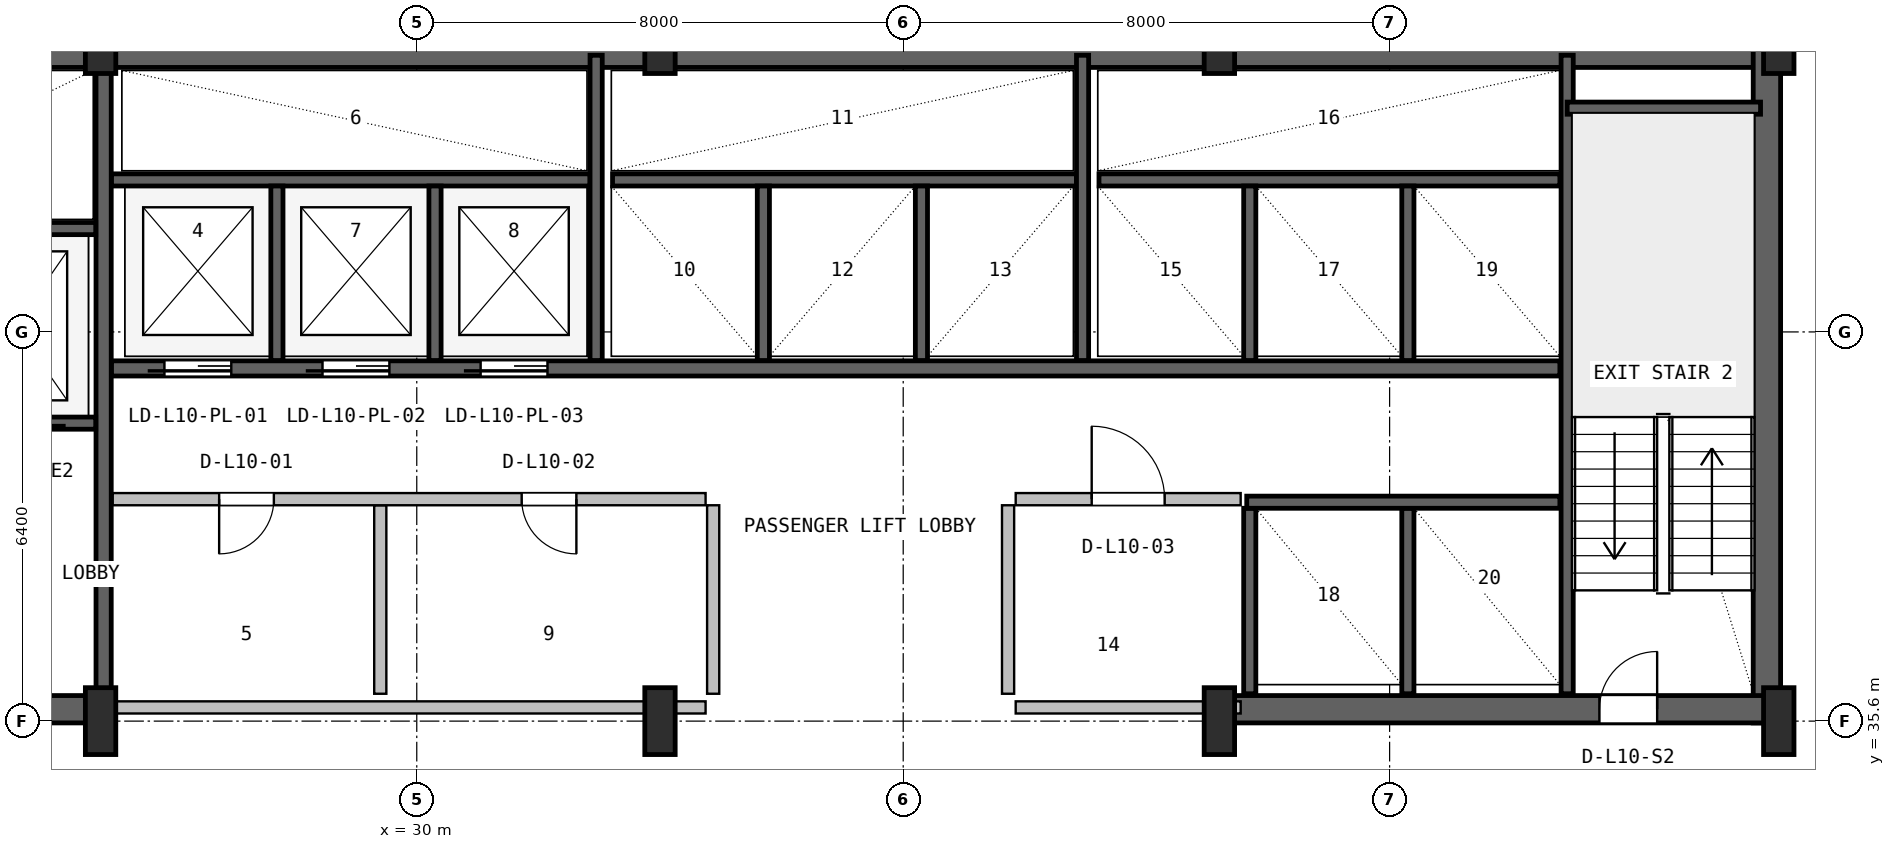
"""IFC4 building model, lengths in metres.
Left out: names, types, materials, properties, quantities, classifications, styles, units other than length and angle.
Written with IfcOpenShell. Run it as: python <this file> out.ifc"""

import sys

from ifc_helpers import new_model, si_unit, direction, frame, frame_2d, origin, origin_2d, place, context, subcontext, project, spatial, rectangle, i_section, extrude, source, transform, mapped, element, fill, save


model = new_model("IFC4")
c1 = context("Model", 3, precision=1e-05, world=origin(), true_north=direction((0.0, 1.0)))
c2 = subcontext(c1, "Body", "Model", "MODEL_VIEW")
j1 = project(units=[si_unit("LENGTHUNIT", "METRE"), si_unit("PLANEANGLEUNIT", "RADIAN")], contexts=[c1])
p1 = place(None, origin())
s1 = spatial("IfcSite", under=j1, at=p1, CompositionType="ELEMENT")
p2 = place(p1, origin())
s2 = spatial("IfcBuilding", under=s1, at=p2, CompositionType="ELEMENT")
p3 = place(p2, frame((0.0, 0.0, 47.1)))
s3 = spatial("IfcBuildingStorey", under=s2, at=p3, CompositionType="ELEMENT", Elevation=47.1)
p4 = place(p3, frame((15.6, 46.575, 0.0), z_axis=(0.0, 0.0, 1.0), x_axis=(1.0, 0.0, 0.0)))
e1 = element("IfcWall", 1, at=p4, inside=s3, PredefinedType="SHEAR", context=c2, shape_type="SweptSolid", body=[
    extrude(rectangle(XDim=36.8, YDim=0.45, at=frame_2d((18.4, 0.0))), origin(), (0.0, 0.0, 1.0), 3.65),
])
p5 = place(p3, frame((52.205, 35.57, 0.0), z_axis=(0.0, 0.0, 1.0), x_axis=(0.0, 1.0, 0.0)))
e2 = element("IfcWall", 2, at=p5, inside=s3, PredefinedType="SHEAR", context=c2, shape_type="SweptSolid", body=[
    extrude(rectangle(XDim=11.23, YDim=0.45, at=frame_2d((5.615, 0.0))), origin(), (0.0, 0.0, 1.0), 3.65),
])
p6 = place(p3, frame((15.57, 35.795, 0.0), z_axis=(0.0, 0.0, 1.0), x_axis=(1.0, 0.0, 0.0)))
e3 = element("IfcWall", 3, at=p6, inside=s3, PredefinedType="SHEAR", context=c2, shape_type="SweptSolid", body=[
    extrude(rectangle(XDim=9.23, YDim=0.45, at=frame_2d((4.615, 0.0))), origin(), (0.0, 0.0, 1.0), 3.65),
])
p7 = place(p6, frame((5.4, 0.0, 0.0)))
e4 = element("IfcOpeningElement", 4, at=p7, cuts=e3, PredefinedType="OPENING", context=c2, shape_type="SweptSolid", body=[
    extrude(rectangle(XDim=1.0, YDim=2.1, at=frame_2d((0.5, 1.05))), frame((0.0, 0.235, 0.0), z_axis=(0.0, -1.0, 0.0), x_axis=(1.0, 0.0, 0.0)), (0.0, 0.0, 1.0), 0.47),
])
p8 = place(p3, frame((43.2, 35.795, 0.0), z_axis=(0.0, 0.0, 1.0), x_axis=(1.0, 0.0, 0.0)))
e5 = element("IfcWall", 5, at=p8, inside=s3, PredefinedType="SHEAR", context=c2, shape_type="SweptSolid", body=[
    extrude(rectangle(XDim=9.23, YDim=0.45, at=frame_2d((4.615, 0.0))), origin(), (0.0, 0.0, 1.0), 3.65),
])
p9 = place(p8, frame((6.25, 0.0, 0.0)))
e6 = element("IfcOpeningElement", 6, at=p9, cuts=e5, PredefinedType="OPENING", context=c2, shape_type="SweptSolid", body=[
    extrude(rectangle(XDim=0.95, YDim=2.1, at=frame_2d((0.475, 1.05))), frame((0.0, 0.235, 0.0), z_axis=(0.0, -1.0, 0.0), x_axis=(1.0, 0.0, 0.0)), (0.0, 0.0, 1.0), 0.47),
])
m1 = source(origin(), c2, "Body", "SweptSolid", [
    extrude(i_section(OverallWidth=0.5, OverallDepth=1.1, WebThickness=0.018, FlangeThickness=0.032, FilletRadius=0.018, at=origin_2d()), origin(), (0.0, 0.0, 1.0), 3.9),
])
for number, where, z_axis, x_axis in (
    (7, (24.8, 35.6, 0.0), (0.0, 0.0, 1.0), (1.0, 0.0, 0.0)),
    (8, (24.8, 46.8, 0.0), (0.0, 0.0, 1.0), (1.0, 0.0, 0.0)),
    (9, (34.0, 35.6, 0.0), (0.0, 0.0, 1.0), (1.0, 0.0, 0.0)),
    (10, (34.0, 46.8, 0.0), (0.0, 0.0, 1.0), (1.0, 0.0, 0.0)),
    (11, (43.2, 35.6, 0.0), (0.0, 0.0, 1.0), (1.0, 0.0, 0.0)),
    (12, (43.2, 46.8, 0.0), (0.0, 0.0, 1.0), (1.0, 0.0, 0.0)),
    (13, (52.4, 35.6, 0.0), (0.0, 0.0, 1.0), (1.0, 0.0, 0.0)),
    (14, (52.4, 46.8, 0.0), (0.0, 0.0, 1.0), (1.0, 0.0, 0.0)),
):
    element("IfcColumn", number, at=place(p3, frame(where, z_axis=z_axis, x_axis=x_axis)), inside=s3, PredefinedType="COLUMN", context=c2, shape_type="MappedRepresentation", body=[
        mapped(m1, transform((0.0, 0.0, 0.0), x_axis=(1.0, 0.0, 0.0), y_axis=(0.0, 1.0, 0.0), z_axis=(0.0, 0.0, 1.0), scale=1.0)),
    ])
p10 = place(p3, frame((24.85, 36.05, 0.0), z_axis=(0.0, 0.0, 1.0), x_axis=(0.0, 1.0, 0.0)))
e15 = element("IfcWall", 15, at=p10, inside=s3, PredefinedType="SHEAR", context=c2, shape_type="SweptSolid", body=[
    extrude(rectangle(XDim=10.45, YDim=0.25, at=frame_2d((5.225, 0.0))), origin(), (0.0, 0.0, 1.0), 3.65),
])
p11 = place(p3, frame((19.2, 40.5, 0.0), z_axis=(0.0, 0.0, 1.0), x_axis=(1.0, 0.0, 0.0)))
e16 = element("IfcWall", 16, at=p11, inside=s3, PredefinedType="SHEAR", context=c2, shape_type="SweptSolid", body=[
    extrude(rectangle(XDim=5.52, YDim=0.2, at=frame_2d((2.76, 0.0))), origin(), (0.0, 0.0, 1.0), 3.65),
])
p12 = place(p11, frame((1.05, 0.0, 0.0)))
e17 = element("IfcOpeningElement", 17, at=p12, cuts=e16, PredefinedType="OPENING", context=c2, shape_type="SweptSolid", body=[
    extrude(rectangle(XDim=1.1, YDim=2.18, at=frame_2d((0.55, 1.09))), frame((0.0, 0.11, 0.0), z_axis=(0.0, -1.0, 0.0), x_axis=(1.0, 0.0, 0.0)), (0.0, 0.0, 1.0), 0.22),
])
p13 = place(p11, frame((3.65, 0.0, 0.0)))
e18 = element("IfcOpeningElement", 18, at=p13, cuts=e16, PredefinedType="OPENING", context=c2, shape_type="SweptSolid", body=[
    extrude(rectangle(XDim=1.1, YDim=2.18, at=frame_2d((0.55, 1.09))), frame((0.0, 0.11, 0.0), z_axis=(0.0, -1.0, 0.0), x_axis=(1.0, 0.0, 0.0)), (0.0, 0.0, 1.0), 0.22),
])
p14 = place(p3, frame((19.2, 43.7, 0.0), z_axis=(0.0, 0.0, 1.0), x_axis=(1.0, 0.0, 0.0)))
e19 = element("IfcWall", 19, at=p14, inside=s3, PredefinedType="SHEAR", context=c2, shape_type="SweptSolid", body=[
    extrude(rectangle(XDim=5.52, YDim=0.2, at=frame_2d((2.76, 0.0))), origin(), (0.0, 0.0, 1.0), 3.65),
])
p15 = place(p3, frame((48.92, 36.05, 0.0), z_axis=(0.0, 0.0, 1.0), x_axis=(0.0, 1.0, 0.0)))
e20 = element("IfcWall", 20, at=p15, inside=s3, PredefinedType="SHEAR", context=c2, shape_type="SweptSolid", body=[
    extrude(rectangle(XDim=10.5, YDim=0.2, at=frame_2d((5.25, 0.0))), origin(), (0.0, 0.0, 1.0), 3.65),
])
p16 = place(p3, frame((48.92, 45.68, 0.0), z_axis=(0.0, 0.0, 1.0), x_axis=(1.0, 0.0, 0.0)))
e21 = element("IfcWall", 21, at=p16, inside=s3, PredefinedType="SHEAR", context=c2, shape_type="SweptSolid", body=[
    extrude(rectangle(XDim=3.18, YDim=0.2, at=frame_2d((1.59, 0.0))), origin(), (0.0, 0.0, 1.0), 3.65),
])
p17 = place(p3, frame((24.98, 41.4, 0.0), z_axis=(0.0, 0.0, 1.0), x_axis=(1.0, 0.0, 0.0)))
e22 = element("IfcWall", 22, at=p17, inside=s3, PredefinedType="SHEAR", context=c2, shape_type="SweptSolid", body=[
    extrude(rectangle(XDim=23.82, YDim=0.25, at=frame_2d((11.91, 0.0))), origin(), (0.0, 0.0, 1.0), 3.65),
])
p18 = place(p17, frame((0.87, 0.0, 0.0)))
e23 = element("IfcOpeningElement", 23, at=p18, cuts=e22, PredefinedType="OPENING", context=c2, shape_type="SweptSolid", body=[
    extrude(rectangle(XDim=1.1, YDim=2.18, at=frame_2d((0.55, 1.09))), frame((0.0, 0.135, 0.0), z_axis=(0.0, -1.0, 0.0), x_axis=(1.0, 0.0, 0.0)), (0.0, 0.0, 1.0), 0.27),
])
p19 = place(p17, frame((3.47, 0.0, 0.0)))
e24 = element("IfcOpeningElement", 24, at=p19, cuts=e22, PredefinedType="OPENING", context=c2, shape_type="SweptSolid", body=[
    extrude(rectangle(XDim=1.1, YDim=2.18, at=frame_2d((0.55, 1.09))), frame((0.0, 0.135, 0.0), z_axis=(0.0, -1.0, 0.0), x_axis=(1.0, 0.0, 0.0)), (0.0, 0.0, 1.0), 0.27),
])
p20 = place(p17, frame((6.07, 0.0, 0.0)))
e25 = element("IfcOpeningElement", 25, at=p20, cuts=e22, PredefinedType="OPENING", context=c2, shape_type="SweptSolid", body=[
    extrude(rectangle(XDim=1.1, YDim=2.18, at=frame_2d((0.55, 1.09))), frame((0.0, 0.135, 0.0), z_axis=(0.0, -1.0, 0.0), x_axis=(1.0, 0.0, 0.0)), (0.0, 0.0, 1.0), 0.27),
])
p21 = place(p3, frame((24.98, 44.5, 0.0), z_axis=(0.0, 0.0, 1.0), x_axis=(1.0, 0.0, 0.0)))
e26 = element("IfcWall", 26, at=p21, inside=s3, PredefinedType="SHEAR", context=c2, shape_type="SweptSolid", body=[
    extrude(rectangle(XDim=7.87, YDim=0.2, at=frame_2d((3.935, 0.0))), origin(), (0.0, 0.0, 1.0), 3.65),
])
for number, where, z_axis, x_axis in (
    (27, (27.7, 41.53, 0.0), (0.0, 0.0, 1.0), (0.0, 1.0, 0.0)),
    (28, (30.3, 41.53, 0.0), (0.0, 0.0, 1.0), (0.0, 1.0, 0.0)),
):
    element("IfcWall", number, at=place(p3, frame(where, z_axis=z_axis, x_axis=x_axis)), inside=s3, PredefinedType="SHEAR", context=c2, shape_type="SweptSolid", body=[
        extrude(rectangle(XDim=2.87, YDim=0.2, at=frame_2d((1.435, 0.0))), origin(), (0.0, 0.0, 1.0), 3.65),
    ])
p22 = place(p3, frame((32.95, 41.53, 0.0), z_axis=(0.0, 0.0, 1.0), x_axis=(0.0, 1.0, 0.0)))
e29 = element("IfcWall", 29, at=p22, inside=s3, PredefinedType="SHEAR", context=c2, shape_type="SweptSolid", body=[
    extrude(rectangle(XDim=5.02, YDim=0.2, at=frame_2d((2.51, 0.0))), origin(), (0.0, 0.0, 1.0), 3.65),
])
p23 = place(p3, frame((33.22, 44.5, 0.0), z_axis=(0.0, 0.0, 1.0), x_axis=(1.0, 0.0, 0.0)))
e30 = element("IfcWall", 30, at=p23, inside=s3, PredefinedType="SHEAR", context=c2, shape_type="SweptSolid", body=[
    extrude(rectangle(XDim=7.63, YDim=0.2, at=frame_2d((3.815, 0.0))), origin(), (0.0, 0.0, 1.0), 3.65),
])
for number, where, z_axis, x_axis in (
    (31, (35.7, 41.53, 0.0), (0.0, 0.0, 1.0), (0.0, 1.0, 0.0)),
    (32, (38.3, 41.53, 0.0), (0.0, 0.0, 1.0), (0.0, 1.0, 0.0)),
):
    element("IfcWall", number, at=place(p3, frame(where, z_axis=z_axis, x_axis=x_axis)), inside=s3, PredefinedType="SHEAR", context=c2, shape_type="SweptSolid", body=[
        extrude(rectangle(XDim=2.87, YDim=0.2, at=frame_2d((1.435, 0.0))), origin(), (0.0, 0.0, 1.0), 3.65),
    ])
p24 = place(p3, frame((40.95, 41.53, 0.0), z_axis=(0.0, 0.0, 1.0), x_axis=(0.0, 1.0, 0.0)))
e33 = element("IfcWall", 33, at=p24, inside=s3, PredefinedType="SHEAR", context=c2, shape_type="SweptSolid", body=[
    extrude(rectangle(XDim=5.02, YDim=0.2, at=frame_2d((2.51, 0.0))), origin(), (0.0, 0.0, 1.0), 3.65),
])
p25 = place(p3, frame((41.22, 44.5, 0.0), z_axis=(0.0, 0.0, 1.0), x_axis=(1.0, 0.0, 0.0)))
e34 = element("IfcWall", 34, at=p25, inside=s3, PredefinedType="SHEAR", context=c2, shape_type="SweptSolid", body=[
    extrude(rectangle(XDim=7.58, YDim=0.2, at=frame_2d((3.79, 0.0))), origin(), (0.0, 0.0, 1.0), 3.65),
])
for number, where, z_axis, x_axis in (
    (35, (43.7, 41.53, 0.0), (0.0, 0.0, 1.0), (0.0, 1.0, 0.0)),
    (36, (46.3, 41.53, 0.0), (0.0, 0.0, 1.0), (0.0, 1.0, 0.0)),
):
    element("IfcWall", number, at=place(p3, frame(where, z_axis=z_axis, x_axis=x_axis)), inside=s3, PredefinedType="SHEAR", context=c2, shape_type="SweptSolid", body=[
        extrude(rectangle(XDim=2.87, YDim=0.2, at=frame_2d((1.435, 0.0))), origin(), (0.0, 0.0, 1.0), 3.65),
    ])
for number, where, z_axis, x_axis in (
    (37, (43.7, 36.05, 0.0), (0.0, 0.0, 1.0), (0.0, 1.0, 0.0)),
    (38, (46.3, 36.05, 0.0), (0.0, 0.0, 1.0), (0.0, 1.0, 0.0)),
):
    element("IfcWall", number, at=place(p3, frame(where, z_axis=z_axis, x_axis=x_axis)), inside=s3, PredefinedType="SHEAR", context=c2, shape_type="SweptSolid", body=[
        extrude(rectangle(XDim=3.05, YDim=0.2, at=frame_2d((1.525, 0.0))), origin(), (0.0, 0.0, 1.0), 3.65),
    ])
p26 = place(p3, frame((43.65, 39.2, 0.0), z_axis=(0.0, 0.0, 1.0), x_axis=(1.0, 0.0, 0.0)))
e39 = element("IfcWall", 39, at=p26, inside=s3, PredefinedType="SHEAR", context=c2, shape_type="SweptSolid", body=[
    extrude(rectangle(XDim=5.15, YDim=0.2, at=frame_2d((2.575, 0.0))), origin(), (0.0, 0.0, 1.0), 3.65),
])
p27 = place(p3, frame((25.0, 35.825, 0.0), z_axis=(0.0, 0.0, 1.0), x_axis=(1.0, 0.0, 0.0)))
e40 = element("IfcWall", 40, at=p27, inside=s3, PredefinedType="PLUMBINGWALL", context=c2, shape_type="SweptSolid", body=[
    extrude(rectangle(XDim=9.75, YDim=0.2, at=frame_2d((4.875, 0.0))), origin(), (0.0, 0.0, 1.0), 2.425),
])
p28 = place(p3, frame((29.4, 36.05, 0.0), z_axis=(0.0, 0.0, 1.0), x_axis=(0.0, 1.0, 0.0)))
e41 = element("IfcWall", 41, at=p28, inside=s3, PredefinedType="PLUMBINGWALL", context=c2, shape_type="SweptSolid", body=[
    extrude(rectangle(XDim=3.1, YDim=0.2, at=frame_2d((1.55, 0.0))), origin(), (0.0, 0.0, 1.0), 3.63),
])
p29 = place(p3, frame((25.0, 39.25, 0.0), z_axis=(0.0, 0.0, 1.0), x_axis=(1.0, 0.0, 0.0)))
e42 = element("IfcWall", 42, at=p29, inside=s3, PredefinedType="PLUMBINGWALL", context=c2, shape_type="SweptSolid", body=[
    extrude(rectangle(XDim=9.75, YDim=0.2, at=frame_2d((4.875, 0.0))), origin(), (0.0, 0.0, 1.0), 3.63),
])
p30 = place(p29, frame((1.75, 0.0, 0.0)))
e43 = element("IfcOpeningElement", 43, at=p30, cuts=e42, PredefinedType="OPENING", context=c2, shape_type="SweptSolid", body=[
    extrude(rectangle(XDim=0.9, YDim=2.06, at=frame_2d((0.45, 1.03))), frame((0.0, 0.11, 0.0), z_axis=(0.0, -1.0, 0.0), x_axis=(1.0, 0.0, 0.0)), (0.0, 0.0, 1.0), 0.22),
])
p31 = place(p29, frame((6.725, 0.0, 0.0)))
e44 = element("IfcOpeningElement", 44, at=p31, cuts=e42, PredefinedType="OPENING", context=c2, shape_type="SweptSolid", body=[
    extrude(rectangle(XDim=0.9, YDim=2.06, at=frame_2d((0.45, 1.03))), frame((0.0, 0.11, 0.0), z_axis=(0.0, -1.0, 0.0), x_axis=(1.0, 0.0, 0.0)), (0.0, 0.0, 1.0), 0.22),
])
p32 = place(p3, frame((34.875, 36.05, 0.0), z_axis=(0.0, 0.0, 1.0), x_axis=(0.0, 1.0, 0.0)))
e45 = element("IfcWall", 45, at=p32, inside=s3, PredefinedType="PLUMBINGWALL", context=c2, shape_type="SweptSolid", body=[
    extrude(rectangle(XDim=3.1, YDim=0.2, at=frame_2d((1.55, 0.0))), origin(), (0.0, 0.0, 1.0), 3.63),
])
p33 = place(p3, frame((39.85, 35.825, 0.0), z_axis=(0.0, 0.0, 1.0), x_axis=(1.0, 0.0, 0.0)))
e46 = element("IfcWall", 46, at=p33, inside=s3, PredefinedType="SOLIDWALL", context=c2, shape_type="SweptSolid", body=[
    extrude(rectangle(XDim=3.7, YDim=0.2, at=frame_2d((1.85, 0.0))), origin(), (0.0, 0.0, 1.0), 2.425),
])
p34 = place(p3, frame((39.85, 39.25, 0.0), z_axis=(0.0, 0.0, 1.0), x_axis=(1.0, 0.0, 0.0)))
e47 = element("IfcWall", 47, at=p34, inside=s3, PredefinedType="SOLIDWALL", context=c2, shape_type="SweptSolid", body=[
    extrude(rectangle(XDim=3.7, YDim=0.2, at=frame_2d((1.85, 0.0))), origin(), (0.0, 0.0, 1.0), 3.63),
])
p35 = place(p34, frame((1.25, 0.0, 0.0)))
e48 = element("IfcOpeningElement", 48, at=p35, cuts=e47, PredefinedType="OPENING", context=c2, shape_type="SweptSolid", body=[
    extrude(rectangle(XDim=1.2, YDim=2.1, at=frame_2d((0.6, 1.05))), frame((0.0, 0.11, 0.0), z_axis=(0.0, -1.0, 0.0), x_axis=(1.0, 0.0, 0.0)), (0.0, 0.0, 1.0), 0.22),
])
p36 = place(p3, frame((39.725, 36.05, 0.0), z_axis=(0.0, 0.0, 1.0), x_axis=(0.0, 1.0, 0.0)))
e49 = element("IfcWall", 49, at=p36, inside=s3, PredefinedType="SOLIDWALL", context=c2, shape_type="SweptSolid", body=[
    extrude(rectangle(XDim=3.1, YDim=0.2, at=frame_2d((1.55, 0.0))), origin(), (0.0, 0.0, 1.0), 3.63),
])
m2 = source(origin(), c2, "Body", "SweptSolid", [
    extrude(rectangle(XDim=0.95, YDim=2.1, at=frame_2d((0.475, 1.05))), frame((0.0, 0.025, 0.0), z_axis=(0.0, -1.0, 0.0), x_axis=(1.0, 0.0, 0.0)), (0.0, 0.0, 1.0), 0.05),
])
p37 = place(p9, origin())
e50 = element("IfcDoor", 50, at=p37, inside=s3, OperationType="SINGLE_SWING_RIGHT", PredefinedType="DOOR", context=c2, shape_type="MappedRepresentation", body=[
    mapped(m2, transform((0.0, 0.0, 0.0), x_axis=(1.0, 0.0, 0.0), y_axis=(0.0, 1.0, 0.0), z_axis=(0.0, 0.0, 1.0), scale=1.0)),
])
fill(e6, e50)
m3 = source(origin(), c2, "Body", "SweptSolid", [
    extrude(rectangle(XDim=1.1, YDim=2.18, at=frame_2d((0.55, 1.09))), frame((0.0, 0.025, 0.0), z_axis=(0.0, -1.0, 0.0), x_axis=(1.0, 0.0, 0.0)), (0.0, 0.0, 1.0), 0.05),
])
p38 = place(p18, frame((1.1, 0.0, 0.0), z_axis=(0.0, 0.0, 1.0), x_axis=(-1.0, 0.0, 0.0)))
e51 = element("IfcDoor", 51, at=p38, inside=s3, OperationType="SLIDING_TO_LEFT", PredefinedType="DOOR", context=c2, shape_type="MappedRepresentation", body=[
    mapped(m3, transform((0.0, 0.0, 0.0), x_axis=(1.0, 0.0, 0.0), y_axis=(0.0, 1.0, 0.0), z_axis=(0.0, 0.0, 1.0), scale=1.0)),
])
fill(e23, e51)
p39 = place(p19, frame((1.1, 0.0, 0.0), z_axis=(0.0, 0.0, 1.0), x_axis=(-1.0, 0.0, 0.0)))
e52 = element("IfcDoor", 52, at=p39, inside=s3, OperationType="SLIDING_TO_LEFT", PredefinedType="DOOR", context=c2, shape_type="MappedRepresentation", body=[
    mapped(m3, transform((0.0, 0.0, 0.0), x_axis=(1.0, 0.0, 0.0), y_axis=(0.0, 1.0, 0.0), z_axis=(0.0, 0.0, 1.0), scale=1.0)),
])
fill(e24, e52)
p40 = place(p20, frame((1.1, 0.0, 0.0), z_axis=(0.0, 0.0, 1.0), x_axis=(-1.0, 0.0, 0.0)))
e53 = element("IfcDoor", 53, at=p40, inside=s3, OperationType="SLIDING_TO_LEFT", PredefinedType="DOOR", context=c2, shape_type="MappedRepresentation", body=[
    mapped(m3, transform((0.0, 0.0, 0.0), x_axis=(1.0, 0.0, 0.0), y_axis=(0.0, 1.0, 0.0), z_axis=(0.0, 0.0, 1.0), scale=1.0)),
])
fill(e25, e53)
m4 = source(origin(), c2, "Body", "SweptSolid", [
    extrude(rectangle(XDim=0.9, YDim=2.06, at=frame_2d((0.45, 1.03))), frame((0.0, 0.025, 0.0), z_axis=(0.0, -1.0, 0.0), x_axis=(1.0, 0.0, 0.0)), (0.0, 0.0, 1.0), 0.05),
])
p41 = place(p30, frame((0.9, 0.0, 0.0), z_axis=(0.0, 0.0, 1.0), x_axis=(-1.0, 0.0, 0.0)))
e54 = element("IfcDoor", 54, at=p41, inside=s3, OperationType="SINGLE_SWING_LEFT", PredefinedType="DOOR", context=c2, shape_type="MappedRepresentation", body=[
    mapped(m4, transform((0.0, 0.0, 0.0), x_axis=(1.0, 0.0, 0.0), y_axis=(0.0, 1.0, 0.0), z_axis=(0.0, 0.0, 1.0), scale=1.0)),
])
fill(e43, e54)
p42 = place(p31, frame((0.9, 0.0, 0.0), z_axis=(0.0, 0.0, 1.0), x_axis=(-1.0, 0.0, 0.0)))
e55 = element("IfcDoor", 55, at=p42, inside=s3, OperationType="SINGLE_SWING_RIGHT", PredefinedType="DOOR", context=c2, shape_type="MappedRepresentation", body=[
    mapped(m4, transform((0.0, 0.0, 0.0), x_axis=(1.0, 0.0, 0.0), y_axis=(0.0, 1.0, 0.0), z_axis=(0.0, 0.0, 1.0), scale=1.0)),
])
fill(e44, e55)
m5 = source(origin(), c2, "Body", "SweptSolid", [
    extrude(rectangle(XDim=1.2, YDim=2.1, at=frame_2d((0.6, 1.05))), frame((0.0, 0.025, 0.0), z_axis=(0.0, -1.0, 0.0), x_axis=(1.0, 0.0, 0.0)), (0.0, 0.0, 1.0), 0.05),
])
p43 = place(p35, origin())
e56 = element("IfcDoor", 56, at=p43, inside=s3, OperationType="SINGLE_SWING_LEFT", PredefinedType="DOOR", context=c2, shape_type="MappedRepresentation", body=[
    mapped(m5, transform((0.0, 0.0, 0.0), x_axis=(1.0, 0.0, 0.0), y_axis=(0.0, 1.0, 0.0), z_axis=(0.0, 0.0, 1.0), scale=1.0)),
])
fill(e48, e56)
save(model, sys.argv[1])
